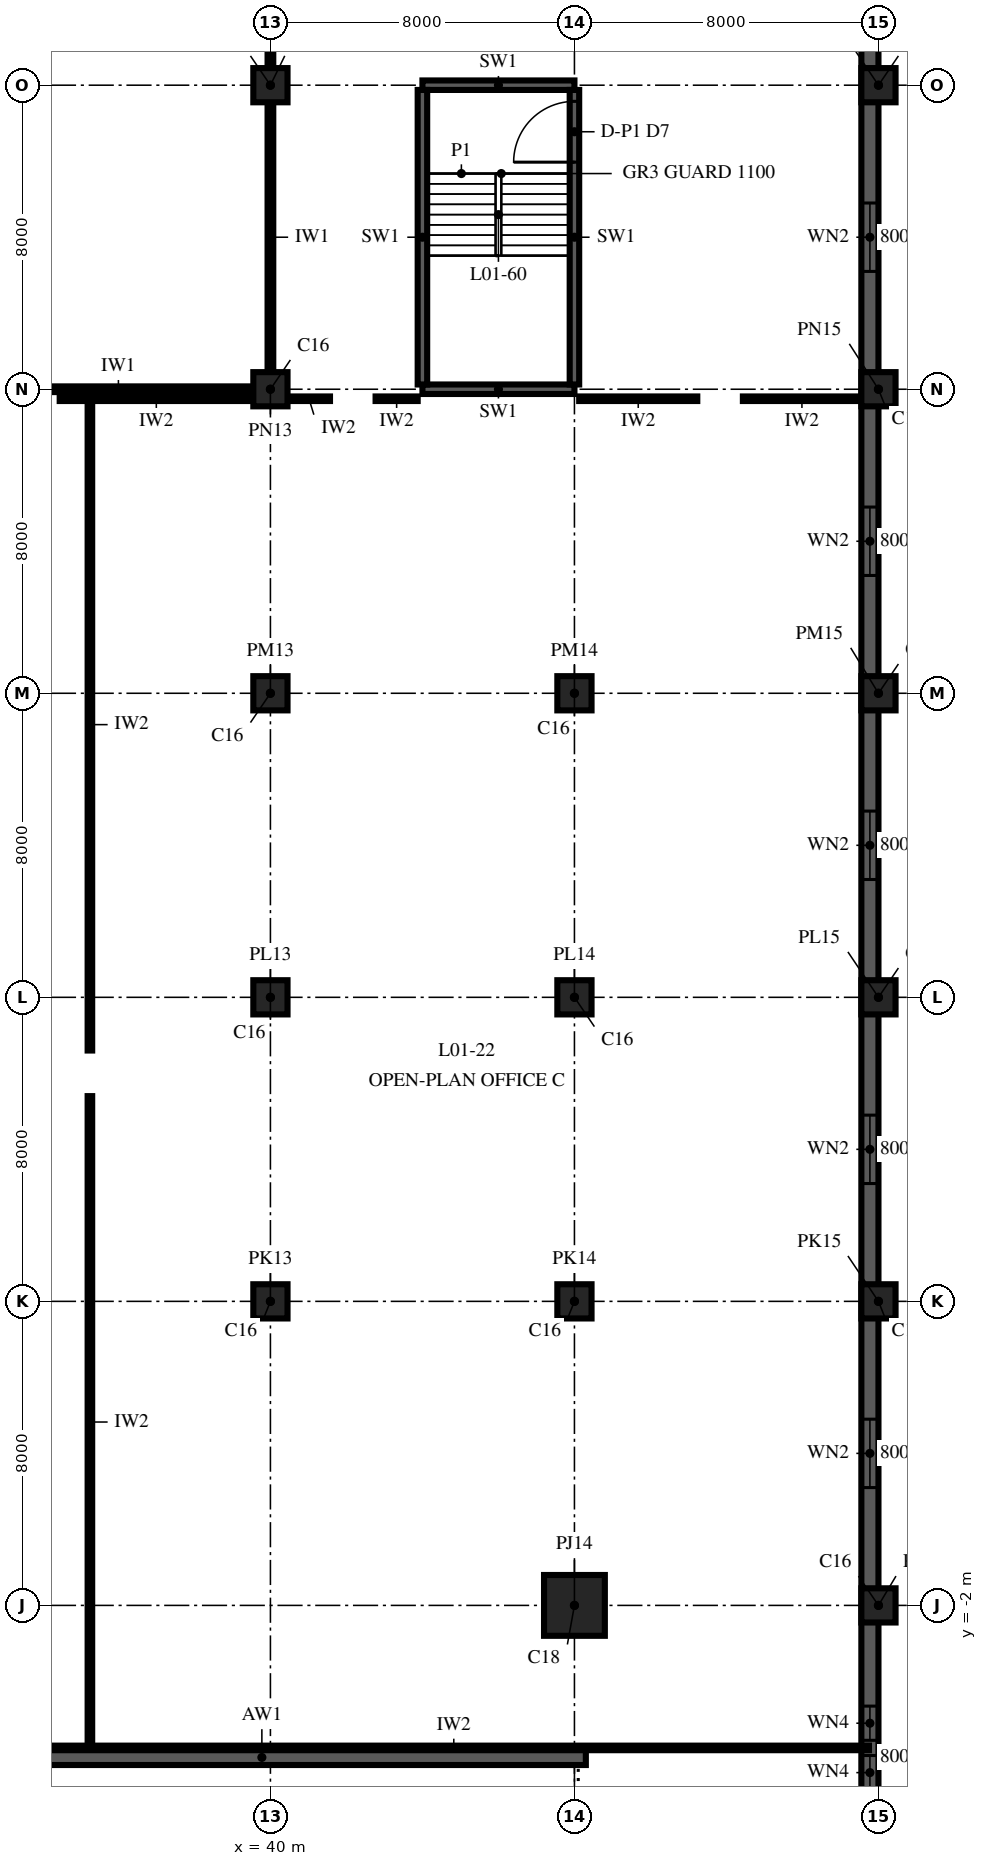
"""IFC4 building model, lengths in metres.
Left out: names, types, materials, properties, quantities, classifications, styles, units other than length and angle.
Written with IfcOpenShell. Run it as: python <this file> out.ifc"""

import sys

from ifc_helpers import new_model, si_unit, direction, frame, frame_2d, origin, origin_2d, place, context, subcontext, project, spatial, rectangle, extrude, element, fill, save


model = new_model("IFC4")
c1 = context("Model", 3, precision=1e-05, world=origin(), true_north=direction((0.0, 1.0)))
c2 = subcontext(c1, "Body", "Model", "MODEL_VIEW")
j1 = project(units=[si_unit("LENGTHUNIT", "METRE"), si_unit("PLANEANGLEUNIT", "RADIAN")], contexts=[c1])
p1 = place(None, origin())
s1 = spatial("IfcSite", under=j1, at=p1, CompositionType="ELEMENT")
p2 = place(p1, origin())
s2 = spatial("IfcBuilding", under=s1, at=p2, CompositionType="ELEMENT")
p3 = place(p2, frame((0.0, 0.0, 6.0)))
s3 = spatial("IfcBuildingStorey", under=s2, at=p3, CompositionType="ELEMENT", Elevation=6.0)
for number, where, z_axis, x_axis in (
    (1, (40.0, 6.0, 0.0), (0.0, 0.0, 1.0), (1.0, 0.0, 0.0)),
    (2, (40.0, 14.0, 0.0), (0.0, 0.0, 1.0), (1.0, 0.0, 0.0)),
    (3, (40.0, 22.0, 0.0), (0.0, 0.0, 1.0), (1.0, 0.0, 0.0)),
    (4, (40.0, 30.0, 0.0), (0.0, 0.0, 1.0), (1.0, 0.0, 0.0)),
    (5, (40.0, 38.0, 0.0), (0.0, 0.0, 1.0), (1.0, 0.0, 0.0)),
):
    element("IfcColumn", number, at=place(p3, frame(where, z_axis=z_axis, x_axis=x_axis)), inside=s3, PredefinedType="COLUMN", context=c2, shape_type="SweptSolid", body=[
        extrude(rectangle(XDim=0.9, YDim=0.9, at=origin_2d()), origin(), (0.0, 0.0, 1.0), 6.0),
    ])
p4 = place(p3, frame((48.0, -2.0, 0.0), z_axis=(0.0, 0.0, 1.0), x_axis=(1.0, 0.0, 0.0)))
e6 = element("IfcColumn", 6, at=p4, inside=s3, PredefinedType="COLUMN", context=c2, shape_type="SweptSolid", body=[
    extrude(rectangle(XDim=1.6, YDim=1.6, at=origin_2d()), origin(), (0.0, 0.0, 1.0), 6.0),
])
for number, where, z_axis, x_axis in (
    (7, (48.0, 6.0, 0.0), (0.0, 0.0, 1.0), (1.0, 0.0, 0.0)),
    (8, (48.0, 14.0, 0.0), (0.0, 0.0, 1.0), (1.0, 0.0, 0.0)),
    (9, (48.0, 22.0, 0.0), (0.0, 0.0, 1.0), (1.0, 0.0, 0.0)),
    (10, (56.0, -2.0, 0.0), (0.0, 0.0, 1.0), (1.0, 0.0, 0.0)),
    (11, (56.0, 6.0, 0.0), (0.0, 0.0, 1.0), (1.0, 0.0, 0.0)),
    (12, (56.0, 14.0, 0.0), (0.0, 0.0, 1.0), (1.0, 0.0, 0.0)),
    (13, (56.0, 22.0, 0.0), (0.0, 0.0, 1.0), (1.0, 0.0, 0.0)),
    (14, (56.0, 30.0, 0.0), (0.0, 0.0, 1.0), (1.0, 0.0, 0.0)),
    (15, (56.0, 38.0, 0.0), (0.0, 0.0, 1.0), (1.0, 0.0, 0.0)),
):
    element("IfcColumn", number, at=place(p3, frame(where, z_axis=z_axis, x_axis=x_axis)), inside=s3, PredefinedType="COLUMN", context=c2, shape_type="SweptSolid", body=[
        extrude(rectangle(XDim=0.9, YDim=0.9, at=origin_2d()), origin(), (0.0, 0.0, 1.0), 6.0),
    ])
p5 = place(p3, frame((31.25, -6.0, 0.0), z_axis=(0.0, 0.0, 1.0), x_axis=(1.0, 0.0, 0.0)))
e16 = element("IfcWall", 16, at=p5, inside=s3, PredefinedType="SHEAR", context=c2, shape_type="SweptSolid", body=[
    extrude(rectangle(XDim=17.05, YDim=0.4, at=frame_2d((8.525, 0.0))), origin(), (0.0, 0.0, 1.0), 6.0),
])
p6 = place(p3, frame((55.775, -73.55, 0.0), z_axis=(0.0, 0.0, 1.0), x_axis=(0.0, 1.0, 0.0)))
e17 = element("IfcWall", 17, at=p6, inside=s3, PredefinedType="SOLIDWALL", context=c2, shape_type="SweptSolid", body=[
    extrude(rectangle(XDim=119.1, YDim=0.45, at=frame_2d((59.55, 0.0))), origin(), (0.0, 0.0, 1.0), 6.0),
])
p7 = place(p6, frame((2.875, 0.0, 1.0)))
e18 = element("IfcOpeningElement", 18, at=p7, cuts=e17, PredefinedType="OPENING", context=c2, shape_type="SweptSolid", body=[
    extrude(rectangle(XDim=1.8, YDim=3.0, at=frame_2d((0.9, 1.5))), frame((0.0, 0.24, 0.0), z_axis=(0.0, -1.0, 0.0), x_axis=(1.0, 0.0, 0.0)), (0.0, 0.0, 1.0), 0.48),
])
p8 = place(p6, frame((10.65, 0.0, 1.0)))
e19 = element("IfcOpeningElement", 19, at=p8, cuts=e17, PredefinedType="OPENING", context=c2, shape_type="SweptSolid", body=[
    extrude(rectangle(XDim=1.8, YDim=3.0, at=frame_2d((0.9, 1.5))), frame((0.0, 0.24, 0.0), z_axis=(0.0, -1.0, 0.0), x_axis=(1.0, 0.0, 0.0)), (0.0, 0.0, 1.0), 0.48),
])
p9 = place(p6, frame((18.65, 0.0, 1.0)))
e20 = element("IfcOpeningElement", 20, at=p9, cuts=e17, PredefinedType="OPENING", context=c2, shape_type="SweptSolid", body=[
    extrude(rectangle(XDim=1.8, YDim=3.0, at=frame_2d((0.9, 1.5))), frame((0.0, 0.24, 0.0), z_axis=(0.0, -1.0, 0.0), x_axis=(1.0, 0.0, 0.0)), (0.0, 0.0, 1.0), 0.48),
])
p10 = place(p6, frame((26.65, 0.0, 1.0)))
e21 = element("IfcOpeningElement", 21, at=p10, cuts=e17, PredefinedType="OPENING", context=c2, shape_type="SweptSolid", body=[
    extrude(rectangle(XDim=1.8, YDim=3.0, at=frame_2d((0.9, 1.5))), frame((0.0, 0.24, 0.0), z_axis=(0.0, -1.0, 0.0), x_axis=(1.0, 0.0, 0.0)), (0.0, 0.0, 1.0), 0.48),
])
p11 = place(p6, frame((34.65, 0.0, 1.0)))
e22 = element("IfcOpeningElement", 22, at=p11, cuts=e17, PredefinedType="OPENING", context=c2, shape_type="SweptSolid", body=[
    extrude(rectangle(XDim=1.8, YDim=3.0, at=frame_2d((0.9, 1.5))), frame((0.0, 0.24, 0.0), z_axis=(0.0, -1.0, 0.0), x_axis=(1.0, 0.0, 0.0)), (0.0, 0.0, 1.0), 0.48),
])
p12 = place(p6, frame((42.65, 0.0, 1.0)))
e23 = element("IfcOpeningElement", 23, at=p12, cuts=e17, PredefinedType="OPENING", context=c2, shape_type="SweptSolid", body=[
    extrude(rectangle(XDim=1.8, YDim=3.0, at=frame_2d((0.9, 1.5))), frame((0.0, 0.24, 0.0), z_axis=(0.0, -1.0, 0.0), x_axis=(1.0, 0.0, 0.0)), (0.0, 0.0, 1.0), 0.48),
])
p13 = place(p6, frame((50.65, 0.0, 1.0)))
e24 = element("IfcOpeningElement", 24, at=p13, cuts=e17, PredefinedType="OPENING", context=c2, shape_type="SweptSolid", body=[
    extrude(rectangle(XDim=1.8, YDim=3.0, at=frame_2d((0.9, 1.5))), frame((0.0, 0.24, 0.0), z_axis=(0.0, -1.0, 0.0), x_axis=(1.0, 0.0, 0.0)), (0.0, 0.0, 1.0), 0.48),
])
p14 = place(p6, frame((58.45, 0.0, 1.0)))
e25 = element("IfcOpeningElement", 25, at=p14, cuts=e17, PredefinedType="OPENING", context=c2, shape_type="SweptSolid", body=[
    extrude(rectangle(XDim=0.9, YDim=3.0, at=frame_2d((0.45, 1.5))), frame((0.0, 0.24, 0.0), z_axis=(0.0, -1.0, 0.0), x_axis=(1.0, 0.0, 0.0)), (0.0, 0.0, 1.0), 0.48),
])
p15 = place(p6, frame((59.75, 0.0, 1.0)))
e26 = element("IfcOpeningElement", 26, at=p15, cuts=e17, PredefinedType="OPENING", context=c2, shape_type="SweptSolid", body=[
    extrude(rectangle(XDim=0.9, YDim=3.0, at=frame_2d((0.45, 1.5))), frame((0.0, 0.24, 0.0), z_axis=(0.0, -1.0, 0.0), x_axis=(1.0, 0.0, 0.0)), (0.0, 0.0, 1.0), 0.48),
])
p16 = place(p6, frame((66.7, 0.0, 1.0)))
e27 = element("IfcOpeningElement", 27, at=p16, cuts=e17, PredefinedType="OPENING", context=c2, shape_type="SweptSolid", body=[
    extrude(rectangle(XDim=0.9, YDim=3.0, at=frame_2d((0.45, 1.5))), frame((0.0, 0.24, 0.0), z_axis=(0.0, -1.0, 0.0), x_axis=(1.0, 0.0, 0.0)), (0.0, 0.0, 1.0), 0.48),
])
p17 = place(p6, frame((68.0, 0.0, 1.0)))
e28 = element("IfcOpeningElement", 28, at=p17, cuts=e17, PredefinedType="OPENING", context=c2, shape_type="SweptSolid", body=[
    extrude(rectangle(XDim=0.9, YDim=3.0, at=frame_2d((0.45, 1.5))), frame((0.0, 0.24, 0.0), z_axis=(0.0, -1.0, 0.0), x_axis=(1.0, 0.0, 0.0)), (0.0, 0.0, 1.0), 0.48),
])
p18 = place(p6, frame((74.65, 0.0, 1.0)))
e29 = element("IfcOpeningElement", 29, at=p18, cuts=e17, PredefinedType="OPENING", context=c2, shape_type="SweptSolid", body=[
    extrude(rectangle(XDim=1.8, YDim=3.0, at=frame_2d((0.9, 1.5))), frame((0.0, 0.24, 0.0), z_axis=(0.0, -1.0, 0.0), x_axis=(1.0, 0.0, 0.0)), (0.0, 0.0, 1.0), 0.48),
])
p19 = place(p6, frame((82.65, 0.0, 1.0)))
e30 = element("IfcOpeningElement", 30, at=p19, cuts=e17, PredefinedType="OPENING", context=c2, shape_type="SweptSolid", body=[
    extrude(rectangle(XDim=1.8, YDim=3.0, at=frame_2d((0.9, 1.5))), frame((0.0, 0.24, 0.0), z_axis=(0.0, -1.0, 0.0), x_axis=(1.0, 0.0, 0.0)), (0.0, 0.0, 1.0), 0.48),
])
p20 = place(p6, frame((90.65, 0.0, 1.0)))
e31 = element("IfcOpeningElement", 31, at=p20, cuts=e17, PredefinedType="OPENING", context=c2, shape_type="SweptSolid", body=[
    extrude(rectangle(XDim=1.8, YDim=3.0, at=frame_2d((0.9, 1.5))), frame((0.0, 0.24, 0.0), z_axis=(0.0, -1.0, 0.0), x_axis=(1.0, 0.0, 0.0)), (0.0, 0.0, 1.0), 0.48),
])
p21 = place(p6, frame((98.65, 0.0, 1.0)))
e32 = element("IfcOpeningElement", 32, at=p21, cuts=e17, PredefinedType="OPENING", context=c2, shape_type="SweptSolid", body=[
    extrude(rectangle(XDim=1.8, YDim=3.0, at=frame_2d((0.9, 1.5))), frame((0.0, 0.24, 0.0), z_axis=(0.0, -1.0, 0.0), x_axis=(1.0, 0.0, 0.0)), (0.0, 0.0, 1.0), 0.48),
])
p22 = place(p6, frame((106.65, 0.0, 1.0)))
e33 = element("IfcOpeningElement", 33, at=p22, cuts=e17, PredefinedType="OPENING", context=c2, shape_type="SweptSolid", body=[
    extrude(rectangle(XDim=1.8, YDim=3.0, at=frame_2d((0.9, 1.5))), frame((0.0, 0.24, 0.0), z_axis=(0.0, -1.0, 0.0), x_axis=(1.0, 0.0, 0.0)), (0.0, 0.0, 1.0), 0.48),
])
p23 = place(p6, frame((114.425, 0.0, 1.0)))
e34 = element("IfcOpeningElement", 34, at=p23, cuts=e17, PredefinedType="OPENING", context=c2, shape_type="SweptSolid", body=[
    extrude(rectangle(XDim=1.8, YDim=3.0, at=frame_2d((0.9, 1.5))), frame((0.0, 0.24, 0.0), z_axis=(0.0, -1.0, 0.0), x_axis=(1.0, 0.0, 0.0)), (0.0, 0.0, 1.0), 0.48),
])
for number, where, z_axis, x_axis in (
    (35, (44.0, 30.0, 0.0), (0.0, 0.0, 1.0), (1.0, 0.0, 0.0)),
    (36, (48.0, 38.0, 0.0), (0.0, 0.0, 1.0), (-1.0, 0.0, 0.0)),
):
    element("IfcWall", number, at=place(p3, frame(where, z_axis=z_axis, x_axis=x_axis)), inside=s3, PredefinedType="SOLIDWALL", context=c2, shape_type="SweptSolid", body=[
        extrude(rectangle(XDim=4.0, YDim=0.25, at=frame_2d((2.0, 0.0))), origin(), (0.0, 0.0, 1.0), 6.0),
    ])
p24 = place(p3, frame((48.0, 30.125, 0.0), z_axis=(0.0, 0.0, 1.0), x_axis=(0.0, 1.0, 0.0)))
e37 = element("IfcWall", 37, at=p24, inside=s3, PredefinedType="SOLIDWALL", context=c2, shape_type="SweptSolid", body=[
    extrude(rectangle(XDim=7.75, YDim=0.25, at=frame_2d((3.875, 0.0))), origin(), (0.0, 0.0, 1.0), 6.0),
])
p25 = place(p24, frame((5.85, 0.0, 0.0)))
e38 = element("IfcOpeningElement", 38, at=p25, cuts=e37, PredefinedType="OPENING", context=c2, shape_type="SweptSolid", body=[
    extrude(rectangle(XDim=1.6, YDim=2.1, at=frame_2d((0.8, 1.05))), frame((0.0, 0.14, 0.0), z_axis=(0.0, -1.0, 0.0), x_axis=(1.0, 0.0, 0.0)), (0.0, 0.0, 1.0), 0.28),
])
p26 = place(p3, frame((44.0, 37.875, 0.0), z_axis=(0.0, 0.0, 1.0), x_axis=(0.0, -1.0, 0.0)))
e39 = element("IfcWall", 39, at=p26, inside=s3, PredefinedType="SOLIDWALL", context=c2, shape_type="SweptSolid", body=[
    extrude(rectangle(XDim=7.75, YDim=0.25, at=frame_2d((3.875, 0.0))), origin(), (0.0, 0.0, 1.0), 6.0),
])
for number, where, z_axis, x_axis in (
    (40, (35.25, -5.75, 0.0), (0.0, 0.0, 1.0), (0.0, 1.0, 0.0)),
    (41, (35.25, 12.6, 0.0), (0.0, 0.0, 1.0), (0.0, 1.0, 0.0)),
):
    element("IfcWall", number, at=place(p3, frame(where, z_axis=z_axis, x_axis=x_axis)), inside=s3, PredefinedType="PARTITIONING", context=c2, shape_type="SweptSolid", body=[
        extrude(rectangle(XDim=17.15, YDim=0.12, at=frame_2d((8.575, 0.0))), origin(), (0.0, 0.0, 1.0), 5.7),
    ])
for number, where, z_axis, x_axis in (
    (42, (40.0, 30.46, 0.0), (0.0, 0.0, 1.0), (0.0, 1.0, 0.0)),
    (43, (40.0, 38.46, 0.0), (0.0, 0.0, 1.0), (0.0, 1.0, 0.0)),
):
    element("IfcWall", number, at=place(p3, frame(where, z_axis=z_axis, x_axis=x_axis)), inside=s3, PredefinedType="PARTITIONING", context=c2, shape_type="SweptSolid", body=[
        extrude(rectangle(XDim=7.08, YDim=0.15, at=frame_2d((3.54, 0.0))), origin(), (0.0, 0.0, 1.0), 5.05),
    ])
p27 = place(p3, frame((33.9, -5.75, 0.0), z_axis=(0.0, 0.0, 1.0), x_axis=(1.0, 0.0, 0.0)))
e44 = element("IfcWall", 44, at=p27, inside=s3, PredefinedType="PARTITIONING", context=c2, shape_type="SweptSolid", body=[
    extrude(rectangle(XDim=21.85, YDim=0.12, at=frame_2d((10.925, 0.0))), origin(), (0.0, 0.0, 1.0), 5.7),
])
p28 = place(p3, frame((34.455, 29.75, 0.0), z_axis=(0.0, 0.0, 1.0), x_axis=(1.0, 0.0, 0.0)))
e45 = element("IfcWall", 45, at=p28, inside=s3, PredefinedType="PARTITIONING", context=c2, shape_type="SweptSolid", body=[
    extrude(rectangle(XDim=5.085, YDim=0.12, at=frame_2d((2.542, 0.0))), origin(), (0.0, 0.0, 1.0), 5.05),
])
for number, where, z_axis, x_axis in (
    (46, (40.46, 29.75, 0.0), (0.0, 0.0, 1.0), (1.0, 0.0, 0.0)),
    (47, (42.768, 29.75, 0.0), (0.0, 0.0, 1.0), (1.0, 0.0, 0.0)),
):
    element("IfcWall", number, at=place(p3, frame(where, z_axis=z_axis, x_axis=x_axis)), inside=s3, PredefinedType="PARTITIONING", context=c2, shape_type="SweptSolid", body=[
        extrude(rectangle(XDim=1.107, YDim=0.12, at=frame_2d((0.554, 0.0))), origin(), (0.0, 0.0, 1.0), 5.7),
    ])
for number, where, z_axis, x_axis in (
    (48, (48.125, 29.75, 0.0), (0.0, 0.0, 1.0), (1.0, 0.0, 0.0)),
    (49, (52.433, 29.75, 0.0), (0.0, 0.0, 1.0), (1.0, 0.0, 0.0)),
):
    element("IfcWall", number, at=place(p3, frame(where, z_axis=z_axis, x_axis=x_axis)), inside=s3, PredefinedType="PARTITIONING", context=c2, shape_type="SweptSolid", body=[
        extrude(rectangle(XDim=3.107, YDim=0.12, at=frame_2d((1.554, 0.0))), origin(), (0.0, 0.0, 1.0), 5.7),
    ])
p29 = place(p3, frame((32.46, 30.0, 0.0), z_axis=(0.0, 0.0, 1.0), x_axis=(1.0, 0.0, 0.0)))
e50 = element("IfcWall", 50, at=p29, inside=s3, PredefinedType="PARTITIONING", context=c2, shape_type="SweptSolid", body=[
    extrude(rectangle(XDim=7.08, YDim=0.15, at=frame_2d((3.54, 0.0))), origin(), (0.0, 0.0, 1.0), 5.05),
])
p30 = place(p16, origin())
e51 = element("IfcWindow", 51, at=p30, inside=s3, PartitioningType="SINGLE_PANEL", PredefinedType="WINDOW", context=c2, shape_type="SweptSolid", body=[
    extrude(rectangle(XDim=0.9, YDim=3.0, at=frame_2d((0.45, 1.5))), frame((0.0, 0.03, 0.0), z_axis=(0.0, -1.0, 0.0), x_axis=(1.0, 0.0, 0.0)), (0.0, 0.0, 1.0), 0.06),
])
fill(e27, e51)
p31 = place(p17, origin())
e52 = element("IfcWindow", 52, at=p31, inside=s3, PartitioningType="SINGLE_PANEL", PredefinedType="WINDOW", context=c2, shape_type="SweptSolid", body=[
    extrude(rectangle(XDim=0.9, YDim=3.0, at=frame_2d((0.45, 1.5))), frame((0.0, 0.03, 0.0), z_axis=(0.0, -1.0, 0.0), x_axis=(1.0, 0.0, 0.0)), (0.0, 0.0, 1.0), 0.06),
])
fill(e28, e52)
p32 = place(p18, origin())
e53 = element("IfcWindow", 53, at=p32, inside=s3, PartitioningType="SINGLE_PANEL", PredefinedType="WINDOW", context=c2, shape_type="SweptSolid", body=[
    extrude(rectangle(XDim=1.8, YDim=3.0, at=frame_2d((0.9, 1.5))), frame((0.0, 0.03, 0.0), z_axis=(0.0, -1.0, 0.0), x_axis=(1.0, 0.0, 0.0)), (0.0, 0.0, 1.0), 0.06),
])
fill(e29, e53)
p33 = place(p19, origin())
e54 = element("IfcWindow", 54, at=p33, inside=s3, PartitioningType="SINGLE_PANEL", PredefinedType="WINDOW", context=c2, shape_type="SweptSolid", body=[
    extrude(rectangle(XDim=1.8, YDim=3.0, at=frame_2d((0.9, 1.5))), frame((0.0, 0.03, 0.0), z_axis=(0.0, -1.0, 0.0), x_axis=(1.0, 0.0, 0.0)), (0.0, 0.0, 1.0), 0.06),
])
fill(e30, e54)
p34 = place(p20, origin())
e55 = element("IfcWindow", 55, at=p34, inside=s3, PartitioningType="SINGLE_PANEL", PredefinedType="WINDOW", context=c2, shape_type="SweptSolid", body=[
    extrude(rectangle(XDim=1.8, YDim=3.0, at=frame_2d((0.9, 1.5))), frame((0.0, 0.03, 0.0), z_axis=(0.0, -1.0, 0.0), x_axis=(1.0, 0.0, 0.0)), (0.0, 0.0, 1.0), 0.06),
])
fill(e31, e55)
p35 = place(p21, origin())
e56 = element("IfcWindow", 56, at=p35, inside=s3, PartitioningType="SINGLE_PANEL", PredefinedType="WINDOW", context=c2, shape_type="SweptSolid", body=[
    extrude(rectangle(XDim=1.8, YDim=3.0, at=frame_2d((0.9, 1.5))), frame((0.0, 0.03, 0.0), z_axis=(0.0, -1.0, 0.0), x_axis=(1.0, 0.0, 0.0)), (0.0, 0.0, 1.0), 0.06),
])
fill(e32, e56)
p36 = place(p22, origin())
e57 = element("IfcWindow", 57, at=p36, inside=s3, PartitioningType="SINGLE_PANEL", PredefinedType="WINDOW", context=c2, shape_type="SweptSolid", body=[
    extrude(rectangle(XDim=1.8, YDim=3.0, at=frame_2d((0.9, 1.5))), frame((0.0, 0.03, 0.0), z_axis=(0.0, -1.0, 0.0), x_axis=(1.0, 0.0, 0.0)), (0.0, 0.0, 1.0), 0.06),
])
fill(e33, e57)
p37 = place(p25, origin())
e58 = element("IfcDoor", 58, at=p37, inside=s3, OperationType="DOUBLE_DOOR_SINGLE_SWING", PredefinedType="DOOR", context=c2, shape_type="SweptSolid", body=[
    extrude(rectangle(XDim=1.6, YDim=2.1, at=frame_2d((0.8, 1.05))), frame((0.0, 0.125, 0.0), z_axis=(0.0, -1.0, 0.0), x_axis=(1.0, 0.0, 0.0)), (0.0, 0.0, 1.0), 0.25),
])
fill(e38, e58)
save(model, sys.argv[1])
